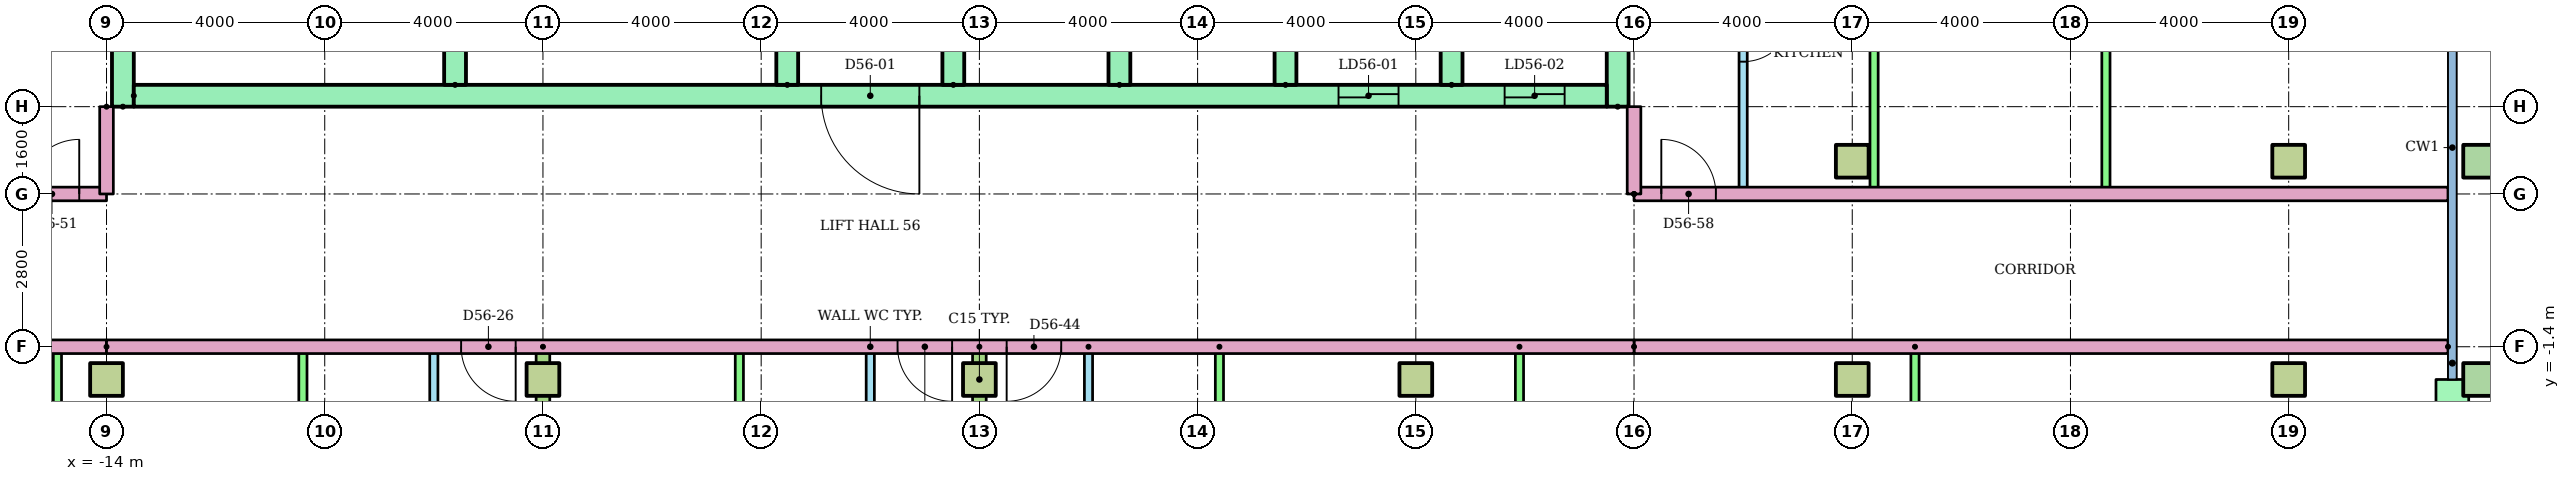
"""IFC4 building model, lengths in metres.
Left out: names, types, materials, properties, quantities, classifications, styles, units other than length and angle.
Written with IfcOpenShell. Run it as: python <this file> out.ifc"""

import sys

from ifc_helpers import new_model, si_unit, direction, frame, frame_2d, origin, origin_2d, place, context, subcontext, project, spatial, rectangle, hollow_rectangle, extrude, element, fill, save


model = new_model("IFC4")
c1 = context("Model", 3, precision=1e-05, world=origin(), true_north=direction((0.0, 1.0)))
c2 = subcontext(c1, "Body", "Model", "MODEL_VIEW")
j1 = project(units=[si_unit("LENGTHUNIT", "METRE"), si_unit("PLANEANGLEUNIT", "RADIAN")], contexts=[c1])
p1 = place(None, origin())
s1 = spatial("IfcSite", under=j1, at=p1, CompositionType="ELEMENT")
p2 = place(p1, origin())
s2 = spatial("IfcBuilding", under=s1, at=p2, CompositionType="ELEMENT")
p3 = place(p2, frame((0.0, 0.0, 217.2)))
s3 = spatial("IfcBuildingStorey", under=s2, at=p3, CompositionType="ELEMENT", Elevation=217.2)
for number, where in (
    (1, (-14.0, -2.0, 0.0)),
    (2, (-6.0, -2.0, 0.0)),
    (3, (2.0, -2.0, 0.0)),
    (4, (10.0, -2.0, 0.0)),
    (5, (18.0, -2.0, 0.0)),
    (6, (26.0, -2.0, 0.0)),
):
    element("IfcColumn", number, at=place(p3, frame(where)), inside=s3, PredefinedType="COLUMN", context=c2, shape_type="SweptSolid", body=[
        extrude(rectangle(XDim=0.6, YDim=0.6, at=origin_2d()), origin(), (0.0, 0.0, 1.0), 3.2),
    ])
p4 = place(p3, frame((29.5, -2.0, 0.0)))
e7 = element("IfcColumn", 7, at=p4, inside=s3, PredefinedType="COLUMN", context=c2, shape_type="SweptSolid", body=[
    extrude(hollow_rectangle(XDim=0.6, YDim=0.6, WallThickness=0.03, at=origin_2d()), origin(), (0.0, 0.0, 1.0), 3.2),
])
for number, where in (
    (8, (18.0, 2.0, 0.0)),
    (9, (26.0, 2.0, 0.0)),
):
    element("IfcColumn", number, at=place(p3, frame(where)), inside=s3, PredefinedType="COLUMN", context=c2, shape_type="SweptSolid", body=[
        extrude(rectangle(XDim=0.6, YDim=0.6, at=origin_2d()), origin(), (0.0, 0.0, 1.0), 3.2),
    ])
p5 = place(p3, frame((29.5, 2.0, 0.0)))
e10 = element("IfcColumn", 10, at=p5, inside=s3, PredefinedType="COLUMN", context=c2, shape_type="SweptSolid", body=[
    extrude(hollow_rectangle(XDim=0.6, YDim=0.6, WallThickness=0.03, at=origin_2d()), origin(), (0.0, 0.0, 1.0), 3.2),
])
p6 = place(p3, frame((29.0, -5.7, 0.0), z_axis=(0.0, 0.0, 1.0), x_axis=(0.0, 1.0, 0.0)))
e11 = element("IfcWall", 11, at=p6, inside=s3, PredefinedType="STANDARD", context=c2, shape_type="SweptSolid", body=[
    extrude(rectangle(XDim=3.7, YDim=0.6, at=frame_2d((1.85, 0.0))), origin(), (0.0, 0.0, 1.0), 2.92),
])
p7 = place(p6, frame((1.25, 0.0, 0.0)))
e12 = element("IfcOpeningElement", 12, at=p7, cuts=e11, PredefinedType="OPENING", context=c2, shape_type="SweptSolid", body=[
    extrude(rectangle(XDim=1.2, YDim=2.1, at=frame_2d((0.6, 1.05))), frame((0.0, 0.31, 0.0), z_axis=(0.0, -1.0, 0.0), x_axis=(1.0, 0.0, 0.0)), (0.0, 0.0, 1.0), 0.62),
])
for number, where, z_axis, x_axis in (
    (13, (-13.7, 3.0, 0.0), (0.0, 0.0, 1.0), (0.0, 1.0, 0.0)),
    (14, (13.7, 3.0, 0.0), (0.0, 0.0, 1.0), (0.0, 1.0, 0.0)),
):
    element("IfcWall", number, at=place(p3, frame(where, z_axis=z_axis, x_axis=x_axis)), inside=s3, PredefinedType="SHEAR", context=c2, shape_type="SweptSolid", body=[
        extrude(rectangle(XDim=17.0, YDim=0.4, at=frame_2d((8.5, 0.0))), origin(), (0.0, 0.0, 1.0), 2.92),
    ])
p8 = place(p3, frame((-13.5, 3.2, 0.0)))
e15 = element("IfcWall", 15, at=p8, inside=s3, PredefinedType="SHEAR", context=c2, shape_type="SweptSolid", body=[
    extrude(rectangle(XDim=27.0, YDim=0.4, at=frame_2d((13.5, 0.0))), origin(), (0.0, 0.0, 1.0), 2.92),
])
p9 = place(p8, frame((22.083, 0.0, 0.0)))
e16 = element("IfcOpeningElement", 16, at=p9, cuts=e15, PredefinedType="OPENING", context=c2, shape_type="SweptSolid", body=[
    extrude(rectangle(XDim=1.1, YDim=2.1, at=frame_2d((0.55, 1.05))), frame((0.0, 0.21, 0.0), z_axis=(0.0, -1.0, 0.0), x_axis=(1.0, 0.0, 0.0)), (0.0, 0.0, 1.0), 0.42),
])
p10 = place(p8, frame((25.128, 0.0, 0.0)))
e17 = element("IfcOpeningElement", 17, at=p10, cuts=e15, PredefinedType="OPENING", context=c2, shape_type="SweptSolid", body=[
    extrude(rectangle(XDim=1.1, YDim=2.1, at=frame_2d((0.55, 1.05))), frame((0.0, 0.21, 0.0), z_axis=(0.0, -1.0, 0.0), x_axis=(1.0, 0.0, 0.0)), (0.0, 0.0, 1.0), 0.42),
])
p11 = place(p8, frame((12.6, 0.0, 0.0)))
e18 = element("IfcOpeningElement", 18, at=p11, cuts=e15, PredefinedType="OPENING", context=c2, shape_type="SweptSolid", body=[
    extrude(rectangle(XDim=1.8, YDim=2.1, at=frame_2d((0.9, 1.05))), frame((0.0, 0.21, 0.0), z_axis=(0.0, -1.0, 0.0), x_axis=(1.0, 0.0, 0.0)), (0.0, 0.0, 1.0), 0.42),
])
for number, where, z_axis, x_axis in (
    (19, (-7.611, 3.4, 0.0), (0.0, 0.0, 1.0), (0.0, 1.0, 0.0)),
    (20, (-1.522, 3.4, 0.0), (0.0, 0.0, 1.0), (0.0, 1.0, 0.0)),
    (21, (1.522, 3.4, 0.0), (0.0, 0.0, 1.0), (0.0, 1.0, 0.0)),
    (22, (4.567, 3.4, 0.0), (0.0, 0.0, 1.0), (0.0, 1.0, 0.0)),
    (23, (7.611, 3.4, 0.0), (0.0, 0.0, 1.0), (0.0, 1.0, 0.0)),
    (24, (10.656, 3.4, 0.0), (0.0, 0.0, 1.0), (0.0, 1.0, 0.0)),
):
    element("IfcWall", number, at=place(p3, frame(where, z_axis=z_axis, x_axis=x_axis)), inside=s3, PredefinedType="SHEAR", context=c2, shape_type="SweptSolid", body=[
        extrude(rectangle(XDim=3.0, YDim=0.4, at=frame_2d((1.5, 0.0))), origin(), (0.0, 0.0, 1.0), 2.92),
    ])
p12 = place(p3, frame((-8.0, -9.4, 0.0), z_axis=(0.0, 0.0, 1.0), x_axis=(0.0, 1.0, 0.0)))
e25 = element("IfcWall", 25, at=p12, inside=s3, PredefinedType="PARTITIONING", context=c2, shape_type="SweptSolid", body=[
    extrude(rectangle(XDim=8.0, YDim=0.15, at=frame_2d((4.0, 0.0))), origin(), (0.0, 0.0, 1.0), 2.4),
])
p13 = place(p12, frame((5.3, 0.0, 0.0)))
e26 = element("IfcOpeningElement", 26, at=p13, cuts=e25, PredefinedType="OPENING", context=c2, shape_type="SweptSolid", body=[
    extrude(rectangle(XDim=0.9, YDim=2.1, at=frame_2d((0.45, 1.05))), frame((0.0, 0.085, 0.0), z_axis=(0.0, -1.0, 0.0), x_axis=(1.0, 0.0, 0.0)), (0.0, 0.0, 1.0), 0.17),
])
p14 = place(p12, frame((1.35, 0.0, 0.0)))
e27 = element("IfcOpeningElement", 27, at=p14, cuts=e25, PredefinedType="OPENING", context=c2, shape_type="SweptSolid", body=[
    extrude(rectangle(XDim=0.8, YDim=2.1, at=frame_2d((0.4, 1.05))), frame((0.0, 0.085, 0.0), z_axis=(0.0, -1.0, 0.0), x_axis=(1.0, 0.0, 0.0)), (0.0, 0.0, 1.0), 0.17),
])
for number, where, z_axis, x_axis in (
    (28, (-10.4, -9.4, 0.0), (0.0, 0.0, 1.0), (0.0, 1.0, 0.0)),
    (29, (-14.9, -9.4, 0.0), (0.0, 0.0, 1.0), (0.0, 1.0, 0.0)),
):
    element("IfcWall", number, at=place(p3, frame(where, z_axis=z_axis, x_axis=x_axis)), inside=s3, PredefinedType="PARTITIONING", context=c2, shape_type="SweptSolid", body=[
        extrude(rectangle(XDim=8.0, YDim=0.15, at=frame_2d((4.0, 0.0))), origin(), (0.0, 0.0, 1.0), 2.4),
    ])
p15 = place(p3, frame((0.0, -9.4, 0.0), z_axis=(0.0, 0.0, 1.0), x_axis=(0.0, 1.0, 0.0)))
e30 = element("IfcWall", 30, at=p15, inside=s3, PredefinedType="PARTITIONING", context=c2, shape_type="SweptSolid", body=[
    extrude(rectangle(XDim=8.0, YDim=0.15, at=frame_2d((4.0, 0.0))), origin(), (0.0, 0.0, 1.0), 2.4),
])
p16 = place(p15, frame((5.3, 0.0, 0.0)))
e31 = element("IfcOpeningElement", 31, at=p16, cuts=e30, PredefinedType="OPENING", context=c2, shape_type="SweptSolid", body=[
    extrude(rectangle(XDim=0.9, YDim=2.1, at=frame_2d((0.45, 1.05))), frame((0.0, 0.085, 0.0), z_axis=(0.0, -1.0, 0.0), x_axis=(1.0, 0.0, 0.0)), (0.0, 0.0, 1.0), 0.17),
])
p17 = place(p15, frame((1.35, 0.0, 0.0)))
e32 = element("IfcOpeningElement", 32, at=p17, cuts=e30, PredefinedType="OPENING", context=c2, shape_type="SweptSolid", body=[
    extrude(rectangle(XDim=0.8, YDim=2.1, at=frame_2d((0.4, 1.05))), frame((0.0, 0.085, 0.0), z_axis=(0.0, -1.0, 0.0), x_axis=(1.0, 0.0, 0.0)), (0.0, 0.0, 1.0), 0.17),
])
p18 = place(p3, frame((-2.4, -9.4, 0.0), z_axis=(0.0, 0.0, 1.0), x_axis=(0.0, 1.0, 0.0)))
e33 = element("IfcWall", 33, at=p18, inside=s3, PredefinedType="PARTITIONING", context=c2, shape_type="SweptSolid", body=[
    extrude(rectangle(XDim=8.0, YDim=0.15, at=frame_2d((4.0, 0.0))), origin(), (0.0, 0.0, 1.0), 2.4),
])
p19 = place(p3, frame((-6.0, -1.4, 0.0), z_axis=(0.0, 0.0, 1.0), x_axis=(0.0, -1.0, 0.0)))
e34 = element("IfcWall", 34, at=p19, inside=s3, PredefinedType="PARTITIONING", context=c2, shape_type="SweptSolid", body=[
    extrude(rectangle(XDim=15.11, YDim=0.25, at=frame_2d((7.555, 0.0))), origin(), (0.0, 0.0, 1.0), 2.4),
])
p20 = place(p3, frame((4.0, -1.4, 0.0), z_axis=(0.0, 0.0, 1.0), x_axis=(0.0, -1.0, 0.0)))
e35 = element("IfcWall", 35, at=p20, inside=s3, PredefinedType="PARTITIONING", context=c2, shape_type="SweptSolid", body=[
    extrude(rectangle(XDim=8.0, YDim=0.15, at=frame_2d((4.0, 0.0))), origin(), (0.0, 0.0, 1.0), 2.4),
])
p21 = place(p20, frame((1.8, 0.0, 0.0)))
e36 = element("IfcOpeningElement", 36, at=p21, cuts=e35, PredefinedType="OPENING", context=c2, shape_type="SweptSolid", body=[
    extrude(rectangle(XDim=0.9, YDim=2.1, at=frame_2d((0.45, 1.05))), frame((0.0, 0.085, 0.0), z_axis=(0.0, -1.0, 0.0), x_axis=(1.0, 0.0, 0.0)), (0.0, 0.0, 1.0), 0.17),
])
p22 = place(p20, frame((5.85, 0.0, 0.0)))
e37 = element("IfcOpeningElement", 37, at=p22, cuts=e35, PredefinedType="OPENING", context=c2, shape_type="SweptSolid", body=[
    extrude(rectangle(XDim=0.8, YDim=2.1, at=frame_2d((0.4, 1.05))), frame((0.0, 0.085, 0.0), z_axis=(0.0, -1.0, 0.0), x_axis=(1.0, 0.0, 0.0)), (0.0, 0.0, 1.0), 0.17),
])
for number, where, z_axis, x_axis in (
    (38, (6.4, -1.4, 0.0), (0.0, 0.0, 1.0), (0.0, -1.0, 0.0)),
    (39, (11.9, -1.4, 0.0), (0.0, 0.0, 1.0), (0.0, -1.0, 0.0)),
    (40, (19.15, -1.4, 0.0), (0.0, 0.0, 1.0), (0.0, -1.0, 0.0)),
):
    element("IfcWall", number, at=place(p3, frame(where, z_axis=z_axis, x_axis=x_axis)), inside=s3, PredefinedType="PARTITIONING", context=c2, shape_type="SweptSolid", body=[
        extrude(rectangle(XDim=8.0, YDim=0.15, at=frame_2d((4.0, 0.0))), origin(), (0.0, 0.0, 1.0), 2.4),
    ])
p23 = place(p3, frame((2.0, -1.4, 0.0), z_axis=(0.0, 0.0, 1.0), x_axis=(0.0, -1.0, 0.0)))
e41 = element("IfcWall", 41, at=p23, inside=s3, PredefinedType="PARTITIONING", context=c2, shape_type="SweptSolid", body=[
    extrude(rectangle(XDim=15.11, YDim=0.25, at=frame_2d((7.555, 0.0))), origin(), (0.0, 0.0, 1.0), 2.4),
])
for number, where, z_axis, x_axis in (
    (42, (-14.0, -1.4, 0.0), (0.0, 0.0, 1.0), (-1.0, 0.0, 0.0)),
    (43, (28.92, -1.4, 0.0), (0.0, 0.0, 1.0), (-1.0, 0.0, 0.0)),
):
    element("IfcWall", number, at=place(p3, frame(where, z_axis=z_axis, x_axis=x_axis)), inside=s3, PredefinedType="PARTITIONING", context=c2, shape_type="SweptSolid", body=[
        extrude(rectangle(XDim=14.92, YDim=0.25, at=frame_2d((7.46, 0.0))), origin(), (0.0, 0.0, 1.0), 2.4),
    ])
p24 = place(p3, frame((-28.92, 1.4, 0.0)))
e44 = element("IfcWall", 44, at=p24, inside=s3, PredefinedType="PARTITIONING", context=c2, shape_type="SweptSolid", body=[
    extrude(rectangle(XDim=14.92, YDim=0.25, at=frame_2d((7.46, 0.0))), origin(), (0.0, 0.0, 1.0), 2.4),
])
p25 = place(p24, frame((13.42, 0.0, 0.0)))
e45 = element("IfcOpeningElement", 45, at=p25, cuts=e44, PredefinedType="OPENING", context=c2, shape_type="SweptSolid", body=[
    extrude(rectangle(XDim=1.0, YDim=2.1, at=frame_2d((0.5, 1.05))), frame((0.0, 0.135, 0.0), z_axis=(0.0, -1.0, 0.0), x_axis=(1.0, 0.0, 0.0)), (0.0, 0.0, 1.0), 0.27),
])
p26 = place(p3, frame((16.0, 11.8, 0.0), z_axis=(0.0, 0.0, 1.0), x_axis=(0.0, -1.0, 0.0)))
e46 = element("IfcWall", 46, at=p26, inside=s3, PredefinedType="PARTITIONING", context=c2, shape_type="SweptSolid", body=[
    extrude(rectangle(XDim=10.4, YDim=0.15, at=frame_2d((5.2, 0.0))), origin(), (0.0, 0.0, 1.0), 2.4),
])
p27 = place(p26, frame((7.075, 0.0, 0.0)))
e47 = element("IfcOpeningElement", 47, at=p27, cuts=e46, PredefinedType="OPENING", context=c2, shape_type="SweptSolid", body=[
    extrude(rectangle(XDim=0.9, YDim=2.1, at=frame_2d((0.45, 1.05))), frame((0.0, 0.085, 0.0), z_axis=(0.0, -1.0, 0.0), x_axis=(1.0, 0.0, 0.0)), (0.0, 0.0, 1.0), 0.17),
])
p28 = place(p26, frame((1.925, 0.0, 0.0)))
e48 = element("IfcOpeningElement", 48, at=p28, cuts=e46, PredefinedType="OPENING", context=c2, shape_type="SweptSolid", body=[
    extrude(rectangle(XDim=0.8, YDim=2.1, at=frame_2d((0.4, 1.05))), frame((0.0, 0.085, 0.0), z_axis=(0.0, -1.0, 0.0), x_axis=(1.0, 0.0, 0.0)), (0.0, 0.0, 1.0), 0.17),
])
for number, where, z_axis, x_axis in (
    (49, (18.4, 11.8, 0.0), (0.0, 0.0, 1.0), (0.0, -1.0, 0.0)),
    (50, (22.65, 11.8, 0.0), (0.0, 0.0, 1.0), (0.0, -1.0, 0.0)),
):
    element("IfcWall", number, at=place(p3, frame(where, z_axis=z_axis, x_axis=x_axis)), inside=s3, PredefinedType="PARTITIONING", context=c2, shape_type="SweptSolid", body=[
        extrude(rectangle(XDim=10.4, YDim=0.15, at=frame_2d((5.2, 0.0))), origin(), (0.0, 0.0, 1.0), 2.4),
    ])
p29 = place(p3, frame((14.0, 1.4, 0.0)))
e51 = element("IfcWall", 51, at=p29, inside=s3, PredefinedType="PARTITIONING", context=c2, shape_type="SweptSolid", body=[
    extrude(rectangle(XDim=14.92, YDim=0.25, at=frame_2d((7.46, 0.0))), origin(), (0.0, 0.0, 1.0), 2.4),
])
p30 = place(p29, frame((0.5, 0.0, 0.0)))
e52 = element("IfcOpeningElement", 52, at=p30, cuts=e51, PredefinedType="OPENING", context=c2, shape_type="SweptSolid", body=[
    extrude(rectangle(XDim=1.0, YDim=2.1, at=frame_2d((0.5, 1.05))), frame((0.0, 0.135, 0.0), z_axis=(0.0, -1.0, 0.0), x_axis=(1.0, 0.0, 0.0)), (0.0, 0.0, 1.0), 0.27),
])
p31 = place(p3, frame((14.0, -1.4, 0.0), z_axis=(0.0, 0.0, 1.0), x_axis=(-1.0, 0.0, 0.0)))
e53 = element("IfcWall", 53, at=p31, inside=s3, PredefinedType="PARTITIONING", context=c2, shape_type="SweptSolid", body=[
    extrude(rectangle(XDim=28.0, YDim=0.25, at=frame_2d((14.0, 0.0))), origin(), (0.0, 0.0, 1.0), 2.4),
])
p32 = place(p31, frame((20.5, 0.0, 0.0)))
e54 = element("IfcOpeningElement", 54, at=p32, cuts=e53, PredefinedType="OPENING", context=c2, shape_type="SweptSolid", body=[
    extrude(rectangle(XDim=1.0, YDim=2.1, at=frame_2d((0.5, 1.05))), frame((0.0, 0.135, 0.0), z_axis=(0.0, -1.0, 0.0), x_axis=(1.0, 0.0, 0.0)), (0.0, 0.0, 1.0), 0.27),
])
p33 = place(p31, frame((12.5, 0.0, 0.0)))
e55 = element("IfcOpeningElement", 55, at=p33, cuts=e53, PredefinedType="OPENING", context=c2, shape_type="SweptSolid", body=[
    extrude(rectangle(XDim=1.0, YDim=2.1, at=frame_2d((0.5, 1.05))), frame((0.0, 0.135, 0.0), z_axis=(0.0, -1.0, 0.0), x_axis=(1.0, 0.0, 0.0)), (0.0, 0.0, 1.0), 0.27),
])
p34 = place(p31, frame((10.5, 0.0, 0.0)))
e56 = element("IfcOpeningElement", 56, at=p34, cuts=e53, PredefinedType="OPENING", context=c2, shape_type="SweptSolid", body=[
    extrude(rectangle(XDim=1.0, YDim=2.1, at=frame_2d((0.5, 1.05))), frame((0.0, 0.135, 0.0), z_axis=(0.0, -1.0, 0.0), x_axis=(1.0, 0.0, 0.0)), (0.0, 0.0, 1.0), 0.27),
])
for number, where, z_axis, x_axis in (
    (57, (-14.0, 3.0, 0.0), (0.0, 0.0, 1.0), (0.0, -1.0, 0.0)),
    (58, (14.0, 1.4, 0.0), (0.0, 0.0, 1.0), (0.0, 1.0, 0.0)),
):
    element("IfcWall", number, at=place(p3, frame(where, z_axis=z_axis, x_axis=x_axis)), inside=s3, PredefinedType="PARTITIONING", context=c2, shape_type="SweptSolid", body=[
        extrude(rectangle(XDim=1.6, YDim=0.25, at=frame_2d((0.8, 0.0))), origin(), (0.0, 0.0, 1.0), 2.4),
    ])
p35 = place(p9, origin())
e59 = element("IfcDoor", 59, at=p35, inside=s3, OperationType="SLIDING_TO_LEFT", PredefinedType="DOOR", context=c2, shape_type="SweptSolid", body=[
    extrude(rectangle(XDim=1.1, YDim=2.1, at=frame_2d((0.55, 1.05))), frame((0.0, 0.025, 0.0), z_axis=(0.0, -1.0, 0.0), x_axis=(1.0, 0.0, 0.0)), (0.0, 0.0, 1.0), 0.05),
])
fill(e16, e59)
p36 = place(p10, origin())
e60 = element("IfcDoor", 60, at=p36, inside=s3, OperationType="SLIDING_TO_LEFT", PredefinedType="DOOR", context=c2, shape_type="SweptSolid", body=[
    extrude(rectangle(XDim=1.1, YDim=2.1, at=frame_2d((0.55, 1.05))), frame((0.0, 0.025, 0.0), z_axis=(0.0, -1.0, 0.0), x_axis=(1.0, 0.0, 0.0)), (0.0, 0.0, 1.0), 0.05),
])
fill(e17, e60)
p37 = place(p11, frame((1.8, 0.0, 0.0), z_axis=(0.0, 0.0, 1.0), x_axis=(-1.0, 0.0, 0.0)))
e61 = element("IfcDoor", 61, at=p37, inside=s3, OperationType="DOUBLE_DOOR_SINGLE_SWING", PredefinedType="DOOR", context=c2, shape_type="SweptSolid", body=[
    extrude(rectangle(XDim=1.8, YDim=2.1, at=frame_2d((0.9, 1.05))), frame((0.0, 0.025, 0.0), z_axis=(0.0, -1.0, 0.0), x_axis=(1.0, 0.0, 0.0)), (0.0, 0.0, 1.0), 0.05),
])
fill(e18, e61)
p38 = place(p32, origin())
e62 = element("IfcDoor", 62, at=p38, inside=s3, OperationType="SINGLE_SWING_LEFT", PredefinedType="DOOR", context=c2, shape_type="SweptSolid", body=[
    extrude(rectangle(XDim=1.0, YDim=2.1, at=frame_2d((0.5, 1.05))), frame((0.0, 0.025, 0.0), z_axis=(0.0, -1.0, 0.0), x_axis=(1.0, 0.0, 0.0)), (0.0, 0.0, 1.0), 0.05),
])
fill(e54, e62)
p39 = place(p33, origin())
e63 = element("IfcDoor", 63, at=p39, inside=s3, OperationType="SINGLE_SWING_LEFT", PredefinedType="DOOR", context=c2, shape_type="SweptSolid", body=[
    extrude(rectangle(XDim=1.0, YDim=2.1, at=frame_2d((0.5, 1.05))), frame((0.0, 0.025, 0.0), z_axis=(0.0, -1.0, 0.0), x_axis=(1.0, 0.0, 0.0)), (0.0, 0.0, 1.0), 0.05),
])
fill(e55, e63)
p40 = place(p34, origin())
e64 = element("IfcDoor", 64, at=p40, inside=s3, OperationType="SINGLE_SWING_RIGHT", PredefinedType="DOOR", context=c2, shape_type="SweptSolid", body=[
    extrude(rectangle(XDim=1.0, YDim=2.1, at=frame_2d((0.5, 1.05))), frame((0.0, 0.025, 0.0), z_axis=(0.0, -1.0, 0.0), x_axis=(1.0, 0.0, 0.0)), (0.0, 0.0, 1.0), 0.05),
])
fill(e56, e64)
p41 = place(p25, origin())
e65 = element("IfcDoor", 65, at=p41, inside=s3, OperationType="SINGLE_SWING_RIGHT", PredefinedType="DOOR", context=c2, shape_type="SweptSolid", body=[
    extrude(rectangle(XDim=1.0, YDim=2.1, at=frame_2d((0.5, 1.05))), frame((0.0, 0.025, 0.0), z_axis=(0.0, -1.0, 0.0), x_axis=(1.0, 0.0, 0.0)), (0.0, 0.0, 1.0), 0.05),
])
fill(e45, e65)
p42 = place(p27, origin())
e66 = element("IfcDoor", 66, at=p42, inside=s3, OperationType="SINGLE_SWING_LEFT", PredefinedType="DOOR", context=c2, shape_type="SweptSolid", body=[
    extrude(rectangle(XDim=0.9, YDim=2.1, at=frame_2d((0.45, 1.05))), frame((0.0, 0.025, 0.0), z_axis=(0.0, -1.0, 0.0), x_axis=(1.0, 0.0, 0.0)), (0.0, 0.0, 1.0), 0.05),
])
fill(e47, e66)
p43 = place(p30, origin())
e67 = element("IfcDoor", 67, at=p43, inside=s3, OperationType="SINGLE_SWING_LEFT", PredefinedType="DOOR", context=c2, shape_type="SweptSolid", body=[
    extrude(rectangle(XDim=1.0, YDim=2.1, at=frame_2d((0.5, 1.05))), frame((0.0, 0.025, 0.0), z_axis=(0.0, -1.0, 0.0), x_axis=(1.0, 0.0, 0.0)), (0.0, 0.0, 1.0), 0.05),
])
fill(e52, e67)
save(model, sys.argv[1])
